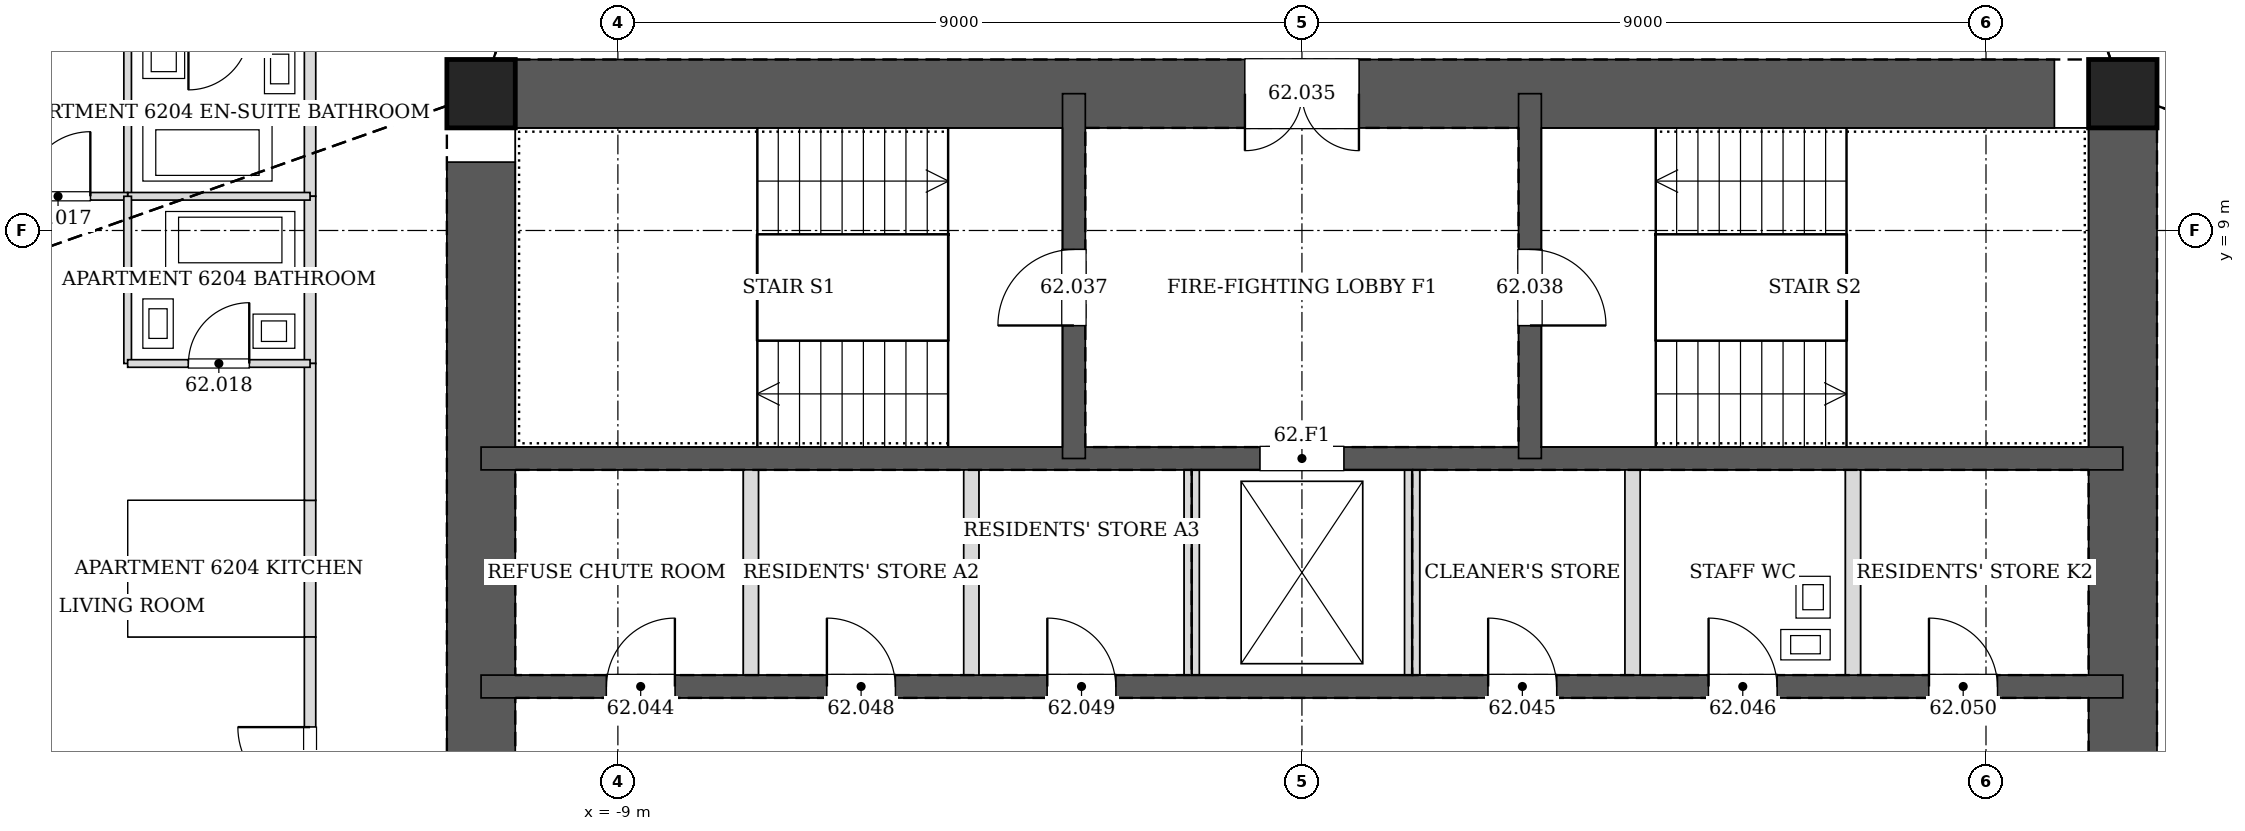
"""IFC4 building model, lengths in metres.
Left out: names, types, materials, properties, quantities, classifications, styles, units other than length and angle.
Written with IfcOpenShell. Run it as: python <this file> out.ifc"""

import sys

from ifc_helpers import new_model, si_unit, direction, frame, frame_2d, origin, origin_2d, place, context, subcontext, project, spatial, rectangle, hollow_rectangle, extrude, element, fill, save


model = new_model("IFC4")
c1 = context("Model", 3, precision=1e-05, world=origin(), true_north=direction((0.0, 1.0)))
c2 = subcontext(c1, "Body", "Model", "MODEL_VIEW")
j1 = project(units=[si_unit("LENGTHUNIT", "METRE"), si_unit("PLANEANGLEUNIT", "RADIAN")], contexts=[c1])
p1 = place(None, origin())
s1 = spatial("IfcSite", under=j1, at=p1, CompositionType="ELEMENT")
p2 = place(p1, origin())
s2 = spatial("IfcBuilding", under=s1, at=p2, CompositionType="ELEMENT")
p3 = place(p2, frame((0.0, 0.0, 258.4)))
s3 = spatial("IfcBuildingStorey", under=s2, at=p3, CompositionType="ELEMENT", Elevation=258.4)
for number, where, z_axis, x_axis in (
    (1, (10.8, 10.8, 0.0), (0.0, 0.0, 1.0), (1.0, 0.0, 0.0)),
    (2, (-10.8, 10.8, 0.0), (0.0, 0.0, 1.0), (1.0, 0.0, 0.0)),
):
    element("IfcColumn", number, at=place(p3, frame(where, z_axis=z_axis, x_axis=x_axis)), inside=s3, PredefinedType="COLUMN", context=c2, shape_type="SweptSolid", body=[
        extrude(hollow_rectangle(XDim=0.9, YDim=0.9, WallThickness=0.04, at=origin_2d()), origin(), (0.0, 0.0, 1.0), 3.4),
    ])
p4 = place(p3, frame((10.8, -10.8, 0.0), z_axis=(0.0, 0.0, 1.0), x_axis=(0.0, 1.0, 0.0)))
e3 = element("IfcWall", 3, at=p4, inside=s3, PredefinedType="SOLIDWALL", context=c2, shape_type="SweptSolid", body=[
    extrude(rectangle(XDim=21.6, YDim=0.9, at=frame_2d((10.8, 0.0))), origin(), (0.0, 0.0, 1.0), 3.4),
])
p5 = place(p4, frame((11.7, 0.0, 0.0)))
e4 = element("IfcOpeningElement", 4, at=p5, cuts=e3, PredefinedType="OPENING", context=c2, shape_type="SweptSolid", body=[
    extrude(rectangle(XDim=1.2, YDim=2.1, at=frame_2d((0.6, 1.05))), frame((0.0, 0.46, 0.0), z_axis=(0.0, -1.0, 0.0), x_axis=(1.0, 0.0, 0.0)), (0.0, 0.0, 1.0), 0.92),
])
p6 = place(p4, frame((8.7, 0.0, 0.0)))
e5 = element("IfcOpeningElement", 5, at=p6, cuts=e3, PredefinedType="OPENING", context=c2, shape_type="SweptSolid", body=[
    extrude(rectangle(XDim=1.2, YDim=2.1, at=frame_2d((0.6, 1.05))), frame((0.0, 0.46, 0.0), z_axis=(0.0, -1.0, 0.0), x_axis=(1.0, 0.0, 0.0)), (0.0, 0.0, 1.0), 0.92),
])
p7 = place(p3, frame((10.8, 10.8, 0.0), z_axis=(0.0, 0.0, 1.0), x_axis=(-1.0, 0.0, 0.0)))
e6 = element("IfcWall", 6, at=p7, inside=s3, PredefinedType="SOLIDWALL", context=c2, shape_type="SweptSolid", body=[
    extrude(rectangle(XDim=21.6, YDim=0.9, at=frame_2d((10.8, 0.0))), origin(), (0.0, 0.0, 1.0), 3.4),
])
p8 = place(p7, frame((10.05, 0.0, 0.0)))
e7 = element("IfcOpeningElement", 7, at=p8, cuts=e6, PredefinedType="OPENING", context=c2, shape_type="SweptSolid", body=[
    extrude(rectangle(XDim=1.5, YDim=2.1, at=frame_2d((0.75, 1.05))), frame((0.0, 0.46, 0.0), z_axis=(0.0, -1.0, 0.0), x_axis=(1.0, 0.0, 0.0)), (0.0, 0.0, 1.0), 0.92),
])
p9 = place(p3, frame((-10.8, 10.8, 0.0), z_axis=(0.0, 0.0, 1.0), x_axis=(0.0, -1.0, 0.0)))
e8 = element("IfcWall", 8, at=p9, inside=s3, PredefinedType="SOLIDWALL", context=c2, shape_type="SweptSolid", body=[
    extrude(rectangle(XDim=21.6, YDim=0.9, at=frame_2d((10.8, 0.0))), origin(), (0.0, 0.0, 1.0), 3.4),
])
p10 = place(p9, frame((8.7, 0.0, 0.0)))
e9 = element("IfcOpeningElement", 9, at=p10, cuts=e8, PredefinedType="OPENING", context=c2, shape_type="SweptSolid", body=[
    extrude(rectangle(XDim=1.2, YDim=2.1, at=frame_2d((0.6, 1.05))), frame((0.0, 0.46, 0.0), z_axis=(0.0, -1.0, 0.0), x_axis=(1.0, 0.0, 0.0)), (0.0, 0.0, 1.0), 0.92),
])
p11 = place(p9, frame((11.7, 0.0, 0.0)))
e10 = element("IfcOpeningElement", 10, at=p11, cuts=e8, PredefinedType="OPENING", context=c2, shape_type="SweptSolid", body=[
    extrude(rectangle(XDim=1.2, YDim=2.1, at=frame_2d((0.6, 1.05))), frame((0.0, 0.46, 0.0), z_axis=(0.0, -1.0, 0.0), x_axis=(1.0, 0.0, 0.0)), (0.0, 0.0, 1.0), 0.92),
])
p12 = place(p3, frame((-10.8, 3.0, 0.0), z_axis=(0.0, 0.0, 1.0), x_axis=(1.0, 0.0, 0.0)))
e11 = element("IfcWall", 11, at=p12, inside=s3, PredefinedType="SOLIDWALL", context=c2, shape_type="SweptSolid", body=[
    extrude(rectangle(XDim=21.6, YDim=0.3, at=frame_2d((10.8, 0.0))), origin(), (0.0, 0.0, 1.0), 3.4),
])
p13 = place(p12, frame((1.65, 0.0, 0.0)))
e12 = element("IfcOpeningElement", 12, at=p13, cuts=e11, PredefinedType="OPENING", context=c2, shape_type="SweptSolid", body=[
    extrude(rectangle(XDim=0.9, YDim=2.1, at=frame_2d((0.45, 1.05))), frame((0.0, 0.16, 0.0), z_axis=(0.0, -1.0, 0.0), x_axis=(1.0, 0.0, 0.0)), (0.0, 0.0, 1.0), 0.32),
])
p14 = place(p12, frame((13.25, 0.0, 0.0)))
e13 = element("IfcOpeningElement", 13, at=p14, cuts=e11, PredefinedType="OPENING", context=c2, shape_type="SweptSolid", body=[
    extrude(rectangle(XDim=0.9, YDim=2.1, at=frame_2d((0.45, 1.05))), frame((0.0, 0.16, 0.0), z_axis=(0.0, -1.0, 0.0), x_axis=(1.0, 0.0, 0.0)), (0.0, 0.0, 1.0), 0.32),
])
p15 = place(p12, frame((16.15, 0.0, 0.0)))
e14 = element("IfcOpeningElement", 14, at=p15, cuts=e11, PredefinedType="OPENING", context=c2, shape_type="SweptSolid", body=[
    extrude(rectangle(XDim=0.9, YDim=2.1, at=frame_2d((0.45, 1.05))), frame((0.0, 0.16, 0.0), z_axis=(0.0, -1.0, 0.0), x_axis=(1.0, 0.0, 0.0)), (0.0, 0.0, 1.0), 0.32),
])
p16 = place(p12, frame((4.55, 0.0, 0.0)))
e15 = element("IfcOpeningElement", 15, at=p16, cuts=e11, PredefinedType="OPENING", context=c2, shape_type="SweptSolid", body=[
    extrude(rectangle(XDim=0.9, YDim=2.1, at=frame_2d((0.45, 1.05))), frame((0.0, 0.16, 0.0), z_axis=(0.0, -1.0, 0.0), x_axis=(1.0, 0.0, 0.0)), (0.0, 0.0, 1.0), 0.32),
])
p17 = place(p12, frame((7.45, 0.0, 0.0)))
e16 = element("IfcOpeningElement", 16, at=p17, cuts=e11, PredefinedType="OPENING", context=c2, shape_type="SweptSolid", body=[
    extrude(rectangle(XDim=0.9, YDim=2.1, at=frame_2d((0.45, 1.05))), frame((0.0, 0.16, 0.0), z_axis=(0.0, -1.0, 0.0), x_axis=(1.0, 0.0, 0.0)), (0.0, 0.0, 1.0), 0.32),
])
p18 = place(p12, frame((19.05, 0.0, 0.0)))
e17 = element("IfcOpeningElement", 17, at=p18, cuts=e11, PredefinedType="OPENING", context=c2, shape_type="SweptSolid", body=[
    extrude(rectangle(XDim=0.9, YDim=2.1, at=frame_2d((0.45, 1.05))), frame((0.0, 0.16, 0.0), z_axis=(0.0, -1.0, 0.0), x_axis=(1.0, 0.0, 0.0)), (0.0, 0.0, 1.0), 0.32),
])
p19 = place(p3, frame((-10.8, 6.0, 0.0), z_axis=(0.0, 0.0, 1.0), x_axis=(1.0, 0.0, 0.0)))
e18 = element("IfcWall", 18, at=p19, inside=s3, PredefinedType="SOLIDWALL", context=c2, shape_type="SweptSolid", body=[
    extrude(rectangle(XDim=21.6, YDim=0.3, at=frame_2d((10.8, 0.0))), origin(), (0.0, 0.0, 1.0), 3.4),
])
p20 = place(p19, frame((10.25, 0.0, 0.0)))
e19 = element("IfcOpeningElement", 19, at=p20, cuts=e18, PredefinedType="OPENING", context=c2, shape_type="SweptSolid", body=[
    extrude(rectangle(XDim=1.1, YDim=2.1, at=frame_2d((0.55, 1.05))), frame((0.0, 0.16, 0.0), z_axis=(0.0, -1.0, 0.0), x_axis=(1.0, 0.0, 0.0)), (0.0, 0.0, 1.0), 0.32),
])
p21 = place(p3, frame((-3.0, 6.0, 0.0), z_axis=(0.0, 0.0, 1.0), x_axis=(0.0, 1.0, 0.0)))
e20 = element("IfcWall", 20, at=p21, inside=s3, PredefinedType="SOLIDWALL", context=c2, shape_type="SweptSolid", body=[
    extrude(rectangle(XDim=4.8, YDim=0.3, at=frame_2d((2.4, 0.0))), origin(), (0.0, 0.0, 1.0), 3.4),
])
p22 = place(p21, frame((1.75, 0.0, 0.0)))
e21 = element("IfcOpeningElement", 21, at=p22, cuts=e20, PredefinedType="OPENING", context=c2, shape_type="SweptSolid", body=[
    extrude(rectangle(XDim=1.0, YDim=2.1, at=frame_2d((0.5, 1.05))), frame((0.0, 0.16, 0.0), z_axis=(0.0, -1.0, 0.0), x_axis=(1.0, 0.0, 0.0)), (0.0, 0.0, 1.0), 0.32),
])
p23 = place(p3, frame((3.0, 6.0, 0.0), z_axis=(0.0, 0.0, 1.0), x_axis=(0.0, 1.0, 0.0)))
e22 = element("IfcWall", 22, at=p23, inside=s3, PredefinedType="SOLIDWALL", context=c2, shape_type="SweptSolid", body=[
    extrude(rectangle(XDim=4.8, YDim=0.3, at=frame_2d((2.4, 0.0))), origin(), (0.0, 0.0, 1.0), 3.4),
])
p24 = place(p23, frame((1.75, 0.0, 0.0)))
e23 = element("IfcOpeningElement", 23, at=p24, cuts=e22, PredefinedType="OPENING", context=c2, shape_type="SweptSolid", body=[
    extrude(rectangle(XDim=1.0, YDim=2.1, at=frame_2d((0.5, 1.05))), frame((0.0, 0.16, 0.0), z_axis=(0.0, -1.0, 0.0), x_axis=(1.0, 0.0, 0.0)), (0.0, 0.0, 1.0), 0.32),
])
p25 = place(p3, frame((-13.05, 11.651, 0.0), z_axis=(0.0, 0.0, 1.0), x_axis=(0.0, -1.0, 0.0)))
e24 = element("IfcWall", 24, at=p25, inside=s3, PredefinedType="PARTITIONING", context=c2, shape_type="SweptSolid", body=[
    extrude(rectangle(XDim=2.202, YDim=0.15, at=frame_2d((1.101, 0.0))), origin(), (0.0, 0.0, 1.0), 2.34),
])
p26 = place(p3, frame((-13.05, 9.451, 0.0), z_axis=(0.0, 0.0, 1.0), x_axis=(0.0, -1.0, 0.0)))
e25 = element("IfcWall", 25, at=p26, inside=s3, PredefinedType="PARTITIONING", context=c2, shape_type="SweptSolid", body=[
    extrude(rectangle(XDim=2.202, YDim=0.15, at=frame_2d((1.101, 0.0))), origin(), (0.0, 0.0, 1.0), 3.15),
])
p27 = place(p3, frame((-13.05, 5.451, 0.0), z_axis=(0.0, 0.0, 1.0), x_axis=(0.0, -1.0, 0.0)))
e26 = element("IfcWall", 26, at=p27, inside=s3, PredefinedType="PARTITIONING", context=c2, shape_type="SweptSolid", body=[
    extrude(rectangle(XDim=1.802, YDim=0.15, at=frame_2d((0.901, 0.0))), origin(), (0.0, 0.0, 1.0), 3.15),
])
p28 = place(p3, frame((-13.05, 3.651, 0.0), z_axis=(0.0, 0.0, 1.0), x_axis=(0.0, -1.0, 0.0)))
e27 = element("IfcWall", 27, at=p28, inside=s3, PredefinedType="PARTITIONING", context=c2, shape_type="SweptSolid", body=[
    extrude(rectangle(XDim=3.321, YDim=0.15, at=frame_2d((1.66, 0.0))), origin(), (0.0, 0.0, 1.0), 3.15),
])
p29 = place(p28, frame((1.186, 0.0, 0.0)))
e28 = element("IfcOpeningElement", 28, at=p29, cuts=e27, PredefinedType="OPENING", context=c2, shape_type="SweptSolid", body=[
    extrude(rectangle(XDim=0.95, YDim=2.1, at=frame_2d((0.475, 1.05))), frame((0.0, 0.085, 0.0), z_axis=(0.0, -1.0, 0.0), x_axis=(1.0, 0.0, 0.0)), (0.0, 0.0, 1.0), 0.17),
])
p30 = place(p3, frame((-13.05, 7.251, 0.0), z_axis=(0.0, 0.0, 1.0), x_axis=(0.0, -1.0, 0.0)))
e29 = element("IfcWall", 29, at=p30, inside=s3, PredefinedType="PARTITIONING", context=c2, shape_type="SweptSolid", body=[
    extrude(rectangle(XDim=1.802, YDim=0.15, at=frame_2d((0.901, 0.0))), origin(), (0.0, 0.0, 1.0), 3.15),
])
p31 = place(p3, frame((-15.45, 11.65, 0.0), z_axis=(0.0, 0.0, 1.0), x_axis=(0.0, -1.0, 0.0)))
e30 = element("IfcWall", 30, at=p31, inside=s3, PredefinedType="PARTITIONING", context=c2, shape_type="SweptSolid", body=[
    extrude(rectangle(XDim=2.2, YDim=0.1, at=frame_2d((1.1, 0.0))), origin(), (0.0, 0.0, 1.0), 2.538),
])
p32 = place(p3, frame((-15.45, 9.45, 0.0), z_axis=(0.0, 0.0, 1.0), x_axis=(1.0, 0.0, 0.0)))
e31 = element("IfcWall", 31, at=p32, inside=s3, PredefinedType="PARTITIONING", context=c2, shape_type="SweptSolid", body=[
    extrude(rectangle(XDim=2.4, YDim=0.1, at=frame_2d((1.2, 0.0))), origin(), (0.0, 0.0, 1.0), 2.34),
])
p33 = place(p3, frame((-17.281, 9.45, 0.0), z_axis=(0.0, 0.0, 1.0), x_axis=(1.0, 0.0, 0.0)))
e32 = element("IfcWall", 32, at=p33, inside=s3, PredefinedType="PARTITIONING", context=c2, shape_type="SweptSolid", body=[
    extrude(rectangle(XDim=1.832, YDim=0.1, at=frame_2d((0.916, 0.0))), origin(), (0.0, 0.0, 1.0), 2.538),
])
p34 = place(p33, frame((0.491, 0.0, 0.0)))
e33 = element("IfcOpeningElement", 33, at=p34, cuts=e32, PredefinedType="OPENING", context=c2, shape_type="SweptSolid", body=[
    extrude(rectangle(XDim=0.85, YDim=2.1, at=frame_2d((0.425, 1.05))), frame((0.0, 0.06, 0.0), z_axis=(0.0, -1.0, 0.0), x_axis=(1.0, 0.0, 0.0)), (0.0, 0.0, 1.0), 0.12),
])
p35 = place(p3, frame((-15.45, 9.45, 0.0), z_axis=(0.0, 0.0, 1.0), x_axis=(0.0, -1.0, 0.0)))
e34 = element("IfcWall", 34, at=p35, inside=s3, PredefinedType="PARTITIONING", context=c2, shape_type="SweptSolid", body=[
    extrude(rectangle(XDim=2.2, YDim=0.1, at=frame_2d((1.1, 0.0))), origin(), (0.0, 0.0, 1.0), 2.34),
])
p36 = place(p3, frame((-15.45, 7.25, 0.0), z_axis=(0.0, 0.0, 1.0), x_axis=(1.0, 0.0, 0.0)))
e35 = element("IfcWall", 35, at=p36, inside=s3, PredefinedType="PARTITIONING", context=c2, shape_type="SweptSolid", body=[
    extrude(rectangle(XDim=2.4, YDim=0.1, at=frame_2d((1.2, 0.0))), origin(), (0.0, 0.0, 1.0), 3.15),
])
p37 = place(p36, frame((0.8, 0.0, 0.0)))
e36 = element("IfcOpeningElement", 36, at=p37, cuts=e35, PredefinedType="OPENING", context=c2, shape_type="SweptSolid", body=[
    extrude(rectangle(XDim=0.8, YDim=2.1, at=frame_2d((0.4, 1.05))), frame((0.0, 0.06, 0.0), z_axis=(0.0, -1.0, 0.0), x_axis=(1.0, 0.0, 0.0)), (0.0, 0.0, 1.0), 0.12),
])
for number, where, z_axis, x_axis in (
    (37, (-7.25, 3.15, 0.0), (0.0, 0.0, 1.0), (0.0, 1.0, 0.0)),
    (38, (-4.35, 3.15, 0.0), (0.0, 0.0, 1.0), (0.0, 1.0, 0.0)),
    (39, (-1.45, 3.15, 0.0), (0.0, 0.0, 1.0), (0.0, 1.0, 0.0)),
    (40, (1.45, 3.15, 0.0), (0.0, 0.0, 1.0), (0.0, 1.0, 0.0)),
    (41, (4.35, 3.15, 0.0), (0.0, 0.0, 1.0), (0.0, 1.0, 0.0)),
    (42, (7.25, 3.15, 0.0), (0.0, 0.0, 1.0), (0.0, 1.0, 0.0)),
):
    element("IfcWall", number, at=place(p3, frame(where, z_axis=z_axis, x_axis=x_axis)), inside=s3, PredefinedType="PARTITIONING", context=c2, shape_type="SweptSolid", body=[
        extrude(rectangle(XDim=2.7, YDim=0.2, at=frame_2d((1.35, 0.0))), origin(), (0.0, 0.0, 1.0), 3.15),
    ])
p38 = place(p34, origin())
e43 = element("IfcDoor", 43, at=p38, inside=s3, OperationType="SINGLE_SWING_RIGHT", PredefinedType="DOOR", context=c2, shape_type="SweptSolid", body=[
    extrude(rectangle(XDim=0.85, YDim=2.1, at=frame_2d((0.425, 1.05))), frame((0.0, 0.025, 0.0), z_axis=(0.0, -1.0, 0.0), x_axis=(1.0, 0.0, 0.0)), (0.0, 0.0, 1.0), 0.05),
])
fill(e33, e43)
p39 = place(p37, origin())
e44 = element("IfcDoor", 44, at=p39, inside=s3, OperationType="SINGLE_SWING_RIGHT", PredefinedType="DOOR", context=c2, shape_type="SweptSolid", body=[
    extrude(rectangle(XDim=0.8, YDim=2.1, at=frame_2d((0.4, 1.05))), frame((0.0, 0.025, 0.0), z_axis=(0.0, -1.0, 0.0), x_axis=(1.0, 0.0, 0.0)), (0.0, 0.0, 1.0), 0.05),
])
fill(e36, e44)
p40 = place(p29, frame((0.95, 0.0, 0.0), z_axis=(0.0, 0.0, 1.0), x_axis=(-1.0, 0.0, 0.0)))
e45 = element("IfcDoor", 45, at=p40, inside=s3, OperationType="SINGLE_SWING_RIGHT", PredefinedType="DOOR", context=c2, shape_type="SweptSolid", body=[
    extrude(rectangle(XDim=0.95, YDim=2.1, at=frame_2d((0.475, 1.05))), frame((0.0, 0.025, 0.0), z_axis=(0.0, -1.0, 0.0), x_axis=(1.0, 0.0, 0.0)), (0.0, 0.0, 1.0), 0.05),
])
fill(e28, e45)
p41 = place(p8, origin())
e46 = element("IfcDoor", 46, at=p41, inside=s3, OperationType="DOUBLE_DOOR_SINGLE_SWING", PredefinedType="DOOR", context=c2, shape_type="SweptSolid", body=[
    extrude(rectangle(XDim=1.5, YDim=2.1, at=frame_2d((0.75, 1.05))), frame((0.0, 0.025, 0.0), z_axis=(0.0, -1.0, 0.0), x_axis=(1.0, 0.0, 0.0)), (0.0, 0.0, 1.0), 0.05),
])
fill(e7, e46)
p42 = place(p22, origin())
e47 = element("IfcDoor", 47, at=p42, inside=s3, OperationType="SINGLE_SWING_LEFT", PredefinedType="DOOR", context=c2, shape_type="SweptSolid", body=[
    extrude(rectangle(XDim=1.0, YDim=2.1, at=frame_2d((0.5, 1.05))), frame((0.0, 0.025, 0.0), z_axis=(0.0, -1.0, 0.0), x_axis=(1.0, 0.0, 0.0)), (0.0, 0.0, 1.0), 0.05),
])
fill(e21, e47)
p43 = place(p24, frame((1.0, 0.0, 0.0), z_axis=(0.0, 0.0, 1.0), x_axis=(-1.0, 0.0, 0.0)))
e48 = element("IfcDoor", 48, at=p43, inside=s3, OperationType="SINGLE_SWING_RIGHT", PredefinedType="DOOR", context=c2, shape_type="SweptSolid", body=[
    extrude(rectangle(XDim=1.0, YDim=2.1, at=frame_2d((0.5, 1.05))), frame((0.0, 0.025, 0.0), z_axis=(0.0, -1.0, 0.0), x_axis=(1.0, 0.0, 0.0)), (0.0, 0.0, 1.0), 0.05),
])
fill(e23, e48)
p44 = place(p13, origin())
e49 = element("IfcDoor", 49, at=p44, inside=s3, OperationType="SINGLE_SWING_RIGHT", PredefinedType="DOOR", context=c2, shape_type="SweptSolid", body=[
    extrude(rectangle(XDim=0.9, YDim=2.1, at=frame_2d((0.45, 1.05))), frame((0.0, 0.025, 0.0), z_axis=(0.0, -1.0, 0.0), x_axis=(1.0, 0.0, 0.0)), (0.0, 0.0, 1.0), 0.05),
])
fill(e12, e49)
p45 = place(p14, origin())
e50 = element("IfcDoor", 50, at=p45, inside=s3, OperationType="SINGLE_SWING_LEFT", PredefinedType="DOOR", context=c2, shape_type="SweptSolid", body=[
    extrude(rectangle(XDim=0.9, YDim=2.1, at=frame_2d((0.45, 1.05))), frame((0.0, 0.025, 0.0), z_axis=(0.0, -1.0, 0.0), x_axis=(1.0, 0.0, 0.0)), (0.0, 0.0, 1.0), 0.05),
])
fill(e13, e50)
p46 = place(p15, origin())
e51 = element("IfcDoor", 51, at=p46, inside=s3, OperationType="SINGLE_SWING_LEFT", PredefinedType="DOOR", context=c2, shape_type="SweptSolid", body=[
    extrude(rectangle(XDim=0.9, YDim=2.1, at=frame_2d((0.45, 1.05))), frame((0.0, 0.025, 0.0), z_axis=(0.0, -1.0, 0.0), x_axis=(1.0, 0.0, 0.0)), (0.0, 0.0, 1.0), 0.05),
])
fill(e14, e51)
p47 = place(p16, origin())
e52 = element("IfcDoor", 52, at=p47, inside=s3, OperationType="SINGLE_SWING_LEFT", PredefinedType="DOOR", context=c2, shape_type="SweptSolid", body=[
    extrude(rectangle(XDim=0.9, YDim=2.1, at=frame_2d((0.45, 1.05))), frame((0.0, 0.025, 0.0), z_axis=(0.0, -1.0, 0.0), x_axis=(1.0, 0.0, 0.0)), (0.0, 0.0, 1.0), 0.05),
])
fill(e15, e52)
p48 = place(p17, origin())
e53 = element("IfcDoor", 53, at=p48, inside=s3, OperationType="SINGLE_SWING_LEFT", PredefinedType="DOOR", context=c2, shape_type="SweptSolid", body=[
    extrude(rectangle(XDim=0.9, YDim=2.1, at=frame_2d((0.45, 1.05))), frame((0.0, 0.025, 0.0), z_axis=(0.0, -1.0, 0.0), x_axis=(1.0, 0.0, 0.0)), (0.0, 0.0, 1.0), 0.05),
])
fill(e16, e53)
p49 = place(p18, origin())
e54 = element("IfcDoor", 54, at=p49, inside=s3, OperationType="SINGLE_SWING_LEFT", PredefinedType="DOOR", context=c2, shape_type="SweptSolid", body=[
    extrude(rectangle(XDim=0.9, YDim=2.1, at=frame_2d((0.45, 1.05))), frame((0.0, 0.025, 0.0), z_axis=(0.0, -1.0, 0.0), x_axis=(1.0, 0.0, 0.0)), (0.0, 0.0, 1.0), 0.05),
])
fill(e17, e54)
p50 = place(p20, origin())
e55 = element("IfcDoor", 55, at=p50, inside=s3, OperationType="DOUBLE_DOOR_SLIDING", PredefinedType="DOOR", context=c2, shape_type="SweptSolid", body=[
    extrude(rectangle(XDim=1.1, YDim=2.1, at=frame_2d((0.55, 1.05))), frame((0.0, 0.025, 0.0), z_axis=(0.0, -1.0, 0.0), x_axis=(1.0, 0.0, 0.0)), (0.0, 0.0, 1.0), 0.05),
])
fill(e19, e55)
save(model, sys.argv[1])
